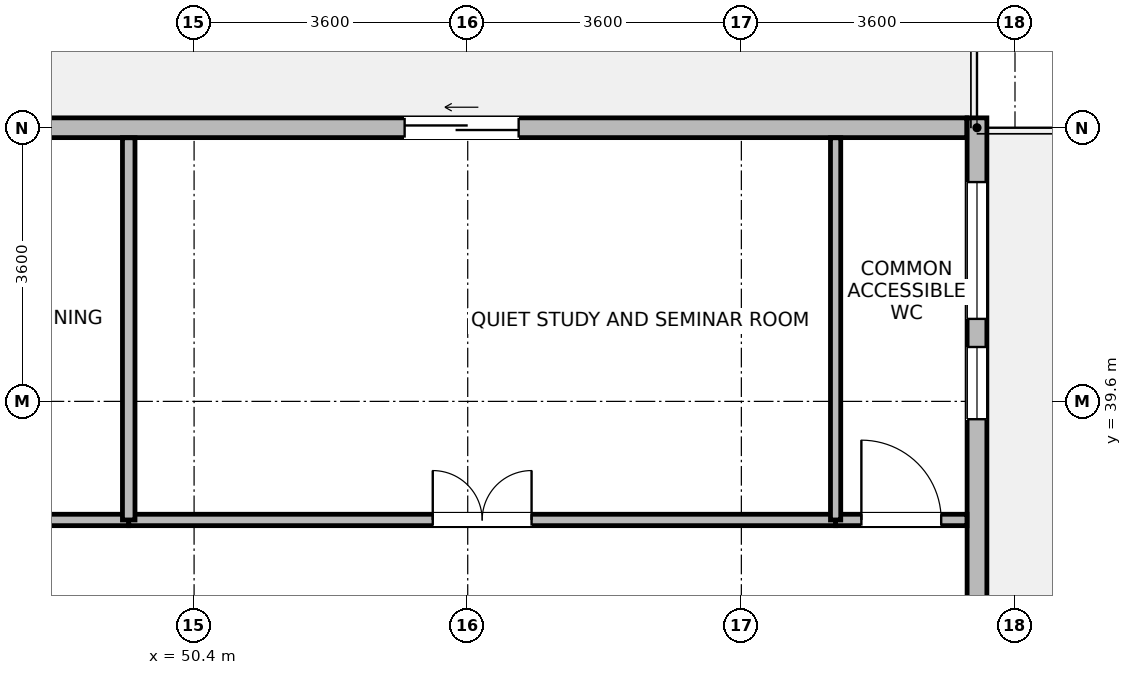
"""IFC4 building model, lengths in metres.
Left out: names, types, materials, properties, quantities, classifications, styles, units other than length and angle.
Written with IfcOpenShell. Run it as: python <this file> out.ifc"""

import sys

from ifc_helpers import new_model, si_unit, direction, frame, frame_2d, origin, place, context, subcontext, project, spatial, rectangle, extrude, element, fill, save


model = new_model("IFC4")
c1 = context("Model", 3, precision=1e-05, world=origin(), true_north=direction((0.0, 1.0)))
c2 = subcontext(c1, "Body", "Model", "MODEL_VIEW")
j1 = project(units=[si_unit("LENGTHUNIT", "METRE"), si_unit("PLANEANGLEUNIT", "RADIAN")], contexts=[c1])
p1 = place(None, origin())
s1 = spatial("IfcSite", under=j1, at=p1, CompositionType="ELEMENT")
p2 = place(p1, origin())
s2 = spatial("IfcBuilding", under=s1, at=p2, CompositionType="ELEMENT")
p3 = place(p2, frame((0.0, 0.0, 201.8)))
s3 = spatial("IfcBuildingStorey", under=s2, at=p3, CompositionType="ELEMENT", Elevation=201.8)
p4 = place(p3, frame((60.7, 43.33, 0.0), z_axis=(0.0, 0.0, 1.0), x_axis=(0.0, -1.0, 0.0)))
e1 = element("IfcWall", 1, at=p4, inside=s3, PredefinedType="STANDARD", context=c2, shape_type="SweptSolid", body=[
    extrude(rectangle(XDim=6.979, YDim=0.26, at=frame_2d((3.49, 0.0))), origin(), (0.0, 0.0, 1.0), 3.45),
])
p5 = place(p4, frame((0.845, 0.0, 0.85)))
e2 = element("IfcOpeningElement", 2, at=p5, cuts=e1, PredefinedType="OPENING", context=c2, shape_type="SweptSolid", body=[
    extrude(rectangle(XDim=1.8, YDim=1.85, at=frame_2d((0.9, 0.925))), frame((0.0, 0.14, 0.0), z_axis=(0.0, -1.0, 0.0), x_axis=(1.0, 0.0, 0.0)), (0.0, 0.0, 1.0), 0.28),
])
p6 = place(p4, frame((3.014, 0.0, 0.85)))
e3 = element("IfcOpeningElement", 3, at=p6, cuts=e1, PredefinedType="OPENING", context=c2, shape_type="SweptSolid", body=[
    extrude(rectangle(XDim=0.95, YDim=1.75, at=frame_2d((0.475, 0.875))), frame((0.0, 0.14, 0.0), z_axis=(0.0, -1.0, 0.0), x_axis=(1.0, 0.0, 0.0)), (0.0, 0.0, 1.0), 0.28),
])
p7 = place(p3, frame((47.276, 43.2, 0.0), z_axis=(0.0, 0.0, 1.0), x_axis=(1.0, 0.0, 0.0)))
e4 = element("IfcWall", 4, at=p7, inside=s3, PredefinedType="STANDARD", context=c2, shape_type="SweptSolid", body=[
    extrude(rectangle(XDim=13.289, YDim=0.26, at=frame_2d((6.645, 0.0))), origin(), (0.0, 0.0, 1.0), 3.45),
])
p8 = place(p7, frame((5.894, 0.0, 0.0)))
e5 = element("IfcOpeningElement", 5, at=p8, cuts=e4, PredefinedType="OPENING", context=c2, shape_type="SweptSolid", body=[
    extrude(rectangle(XDim=1.5, YDim=2.15, at=frame_2d((0.75, 1.075))), frame((0.0, 0.14, 0.0), z_axis=(0.0, -1.0, 0.0), x_axis=(1.0, 0.0, 0.0)), (0.0, 0.0, 1.0), 0.28),
])
p9 = place(p3, frame((35.46, 38.04, 0.0), z_axis=(0.0, 0.0, 1.0), x_axis=(1.0, 0.0, 0.0)))
e6 = element("IfcWall", 6, at=p9, inside=s3, PredefinedType="PARTITIONING", context=c2, shape_type="SweptSolid", body=[
    extrude(rectangle(XDim=14.08, YDim=0.15, at=frame_2d((7.04, 0.0))), origin(), (0.0, 0.0, 1.0), 3.45),
])
p10 = place(p9, frame((6.59, 0.0, 0.0)))
e7 = element("IfcOpeningElement", 7, at=p10, cuts=e6, PredefinedType="OPENING", context=c2, shape_type="SweptSolid", body=[
    extrude(rectangle(XDim=0.9, YDim=2.08, at=frame_2d((0.45, 1.04))), frame((0.0, 0.085, 0.0), z_axis=(0.0, -1.0, 0.0), x_axis=(1.0, 0.0, 0.0)), (0.0, 0.0, 1.0), 0.17),
])
p11 = place(p3, frame((49.54, 38.04, 0.0), z_axis=(0.0, 0.0, 1.0), x_axis=(1.0, 0.0, 0.0)))
e8 = element("IfcWall", 8, at=p11, inside=s3, PredefinedType="PARTITIONING", context=c2, shape_type="SweptSolid", body=[
    extrude(rectangle(XDim=9.3, YDim=0.15, at=frame_2d((4.65, 0.0))), origin(), (0.0, 0.0, 1.0), 3.45),
])
p12 = place(p11, frame((4.0, 0.0, 0.0)))
e9 = element("IfcOpeningElement", 9, at=p12, cuts=e8, PredefinedType="OPENING", context=c2, shape_type="SweptSolid", body=[
    extrude(rectangle(XDim=1.3, YDim=2.12, at=frame_2d((0.65, 1.06))), frame((0.0, 0.085, 0.0), z_axis=(0.0, -1.0, 0.0), x_axis=(1.0, 0.0, 0.0)), (0.0, 0.0, 1.0), 0.17),
])
p13 = place(p3, frame((58.84, 38.04, 0.0), z_axis=(0.0, 0.0, 1.0), x_axis=(1.0, 0.0, 0.0)))
e10 = element("IfcWall", 10, at=p13, inside=s3, PredefinedType="PARTITIONING", context=c2, shape_type="SweptSolid", body=[
    extrude(rectangle(XDim=1.728, YDim=0.15, at=frame_2d((0.864, 0.0))), origin(), (0.0, 0.0, 1.0), 3.45),
])
p14 = place(p13, frame((0.339, 0.0, 0.0)))
e11 = element("IfcOpeningElement", 11, at=p14, cuts=e10, PredefinedType="OPENING", context=c2, shape_type="SweptSolid", body=[
    extrude(rectangle(XDim=1.05, YDim=2.12, at=frame_2d((0.525, 1.06))), frame((0.0, 0.085, 0.0), z_axis=(0.0, -1.0, 0.0), x_axis=(1.0, 0.0, 0.0)), (0.0, 0.0, 1.0), 0.17),
])
p15 = place(p3, frame((49.54, 38.04, 0.0), z_axis=(0.0, 0.0, 1.0), x_axis=(0.0, 1.0, 0.0)))
e12 = element("IfcWall", 12, at=p15, inside=s3, PredefinedType="PARTITIONING", context=c2, shape_type="SweptSolid", body=[
    extrude(rectangle(XDim=5.028, YDim=0.165, at=frame_2d((2.514, 0.0))), origin(), (0.0, 0.0, 1.0), 3.45),
])
p16 = place(p3, frame((58.84, 38.04, 0.0), z_axis=(0.0, 0.0, 1.0), x_axis=(0.0, 1.0, 0.0)))
e13 = element("IfcWall", 13, at=p16, inside=s3, PredefinedType="PARTITIONING", context=c2, shape_type="SweptSolid", body=[
    extrude(rectangle(XDim=5.028, YDim=0.135, at=frame_2d((2.514, 0.0))), origin(), (0.0, 0.0, 1.0), 3.45),
])
p17 = place(p5, origin())
e14 = element("IfcWindow", 14, at=p17, inside=s3, PartitioningType="SINGLE_PANEL", PredefinedType="WINDOW", context=c2, shape_type="SweptSolid", body=[
    extrude(rectangle(XDim=1.8, YDim=1.85, at=frame_2d((0.9, 0.925))), frame((0.0, 0.03, 0.0), z_axis=(0.0, -1.0, 0.0), x_axis=(1.0, 0.0, 0.0)), (0.0, 0.0, 1.0), 0.06),
])
fill(e2, e14)
p18 = place(p6, origin())
e15 = element("IfcWindow", 15, at=p18, inside=s3, PartitioningType="SINGLE_PANEL", PredefinedType="WINDOW", context=c2, shape_type="SweptSolid", body=[
    extrude(rectangle(XDim=0.95, YDim=1.75, at=frame_2d((0.475, 0.875))), frame((0.0, 0.03, 0.0), z_axis=(0.0, -1.0, 0.0), x_axis=(1.0, 0.0, 0.0)), (0.0, 0.0, 1.0), 0.06),
])
fill(e3, e15)
p19 = place(p8, origin())
e16 = element("IfcDoor", 16, at=p19, inside=s3, OperationType="SLIDING_TO_LEFT", PredefinedType="DOOR", context=c2, shape_type="SweptSolid", body=[
    extrude(rectangle(XDim=1.5, YDim=2.15, at=frame_2d((0.75, 1.075))), frame((0.0, 0.025, 0.0), z_axis=(0.0, -1.0, 0.0), x_axis=(1.0, 0.0, 0.0)), (0.0, 0.0, 1.0), 0.05),
])
fill(e5, e16)
p20 = place(p12, origin())
e17 = element("IfcDoor", 17, at=p20, inside=s3, OperationType="DOUBLE_DOOR_SINGLE_SWING", PredefinedType="DOOR", context=c2, shape_type="SweptSolid", body=[
    extrude(rectangle(XDim=1.3, YDim=2.12, at=frame_2d((0.65, 1.06))), frame((0.0, 0.025, 0.0), z_axis=(0.0, -1.0, 0.0), x_axis=(1.0, 0.0, 0.0)), (0.0, 0.0, 1.0), 0.05),
])
fill(e9, e17)
p21 = place(p14, origin())
e18 = element("IfcDoor", 18, at=p21, inside=s3, OperationType="SINGLE_SWING_LEFT", PredefinedType="DOOR", context=c2, shape_type="SweptSolid", body=[
    extrude(rectangle(XDim=1.05, YDim=2.12, at=frame_2d((0.525, 1.06))), frame((0.0, 0.025, 0.0), z_axis=(0.0, -1.0, 0.0), x_axis=(1.0, 0.0, 0.0)), (0.0, 0.0, 1.0), 0.05),
])
fill(e11, e18)
save(model, sys.argv[1])
